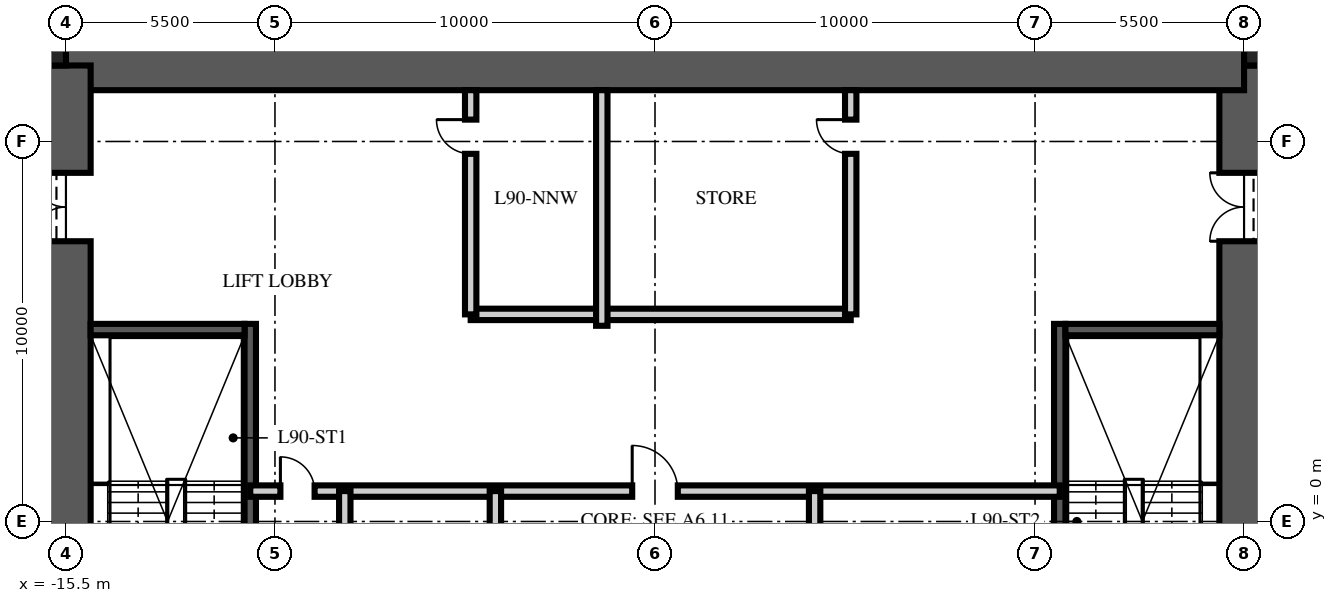
"""IFC4 building model, lengths in metres.
Left out: names, types, materials, properties, quantities, classifications, styles, units other than length and angle.
Written with IfcOpenShell. Run it as: python <this file> out.ifc"""

import sys

from ifc_helpers import new_model, si_unit, direction, frame, frame_2d, origin, origin_2d, place, context, subcontext, project, spatial, rectangle, extrude, element, fill, save


model = new_model("IFC4")
c1 = context("Model", 3, precision=1e-05, world=origin(), true_north=direction((0.0, 1.0)))
c2 = subcontext(c1, "Body", "Model", "MODEL_VIEW")
j1 = project(units=[si_unit("LENGTHUNIT", "METRE"), si_unit("PLANEANGLEUNIT", "RADIAN")], contexts=[c1])
p1 = place(None, origin())
s1 = spatial("IfcSite", under=j1, at=p1, CompositionType="ELEMENT")
p2 = place(p1, origin())
s2 = spatial("IfcBuilding", under=s1, at=p2, CompositionType="ELEMENT")
p3 = place(p2, frame((0.0, 0.0, 358.25)))
s3 = spatial("IfcBuildingStorey", under=s2, at=p3, CompositionType="ELEMENT", Elevation=358.25)
p4 = place(p3, frame((15.5, -12.0, -0.3), z_axis=(0.0, 0.0, 1.0), x_axis=(0.0, 1.0, 0.0)))
e1 = element("IfcWall", 1, at=p4, inside=s3, PredefinedType="SHEAR", context=c2, shape_type="SweptSolid", body=[
    extrude(rectangle(XDim=24.0, YDim=1.3, at=frame_2d((12.0, 0.0))), origin(), (0.0, 0.0, 1.0), 4.95),
])
p5 = place(p4, frame((3.125, 0.0, 0.3)))
e2 = element("IfcOpeningElement", 2, at=p5, cuts=e1, PredefinedType="OPENING", context=c2, shape_type="SweptSolid", body=[
    extrude(rectangle(XDim=1.2, YDim=2.1, at=frame_2d((0.6, 1.05))), frame((0.0, 0.66, 0.0), z_axis=(0.0, -1.0, 0.0), x_axis=(1.0, 0.0, 0.0)), (0.0, 0.0, 1.0), 1.32),
])
p6 = place(p4, frame((19.375, 0.0, 0.3)))
e3 = element("IfcOpeningElement", 3, at=p6, cuts=e1, PredefinedType="OPENING", context=c2, shape_type="SweptSolid", body=[
    extrude(rectangle(XDim=1.8, YDim=2.1, at=frame_2d((0.9, 1.05))), frame((0.0, 0.66, 0.0), z_axis=(0.0, -1.0, 0.0), x_axis=(1.0, 0.0, 0.0)), (0.0, 0.0, 1.0), 1.32),
])
p7 = place(p3, frame((-15.5, 12.0, -0.3), z_axis=(0.0, 0.0, 1.0), x_axis=(1.0, 0.0, 0.0)))
e4 = element("IfcWall", 4, at=p7, inside=s3, PredefinedType="SHEAR", context=c2, shape_type="SweptSolid", body=[
    extrude(rectangle(XDim=31.0, YDim=1.3, at=frame_2d((15.5, 0.0))), origin(), (0.0, 0.0, 1.0), 4.95),
])
p8 = place(p3, frame((-15.5, -12.0, -0.3), z_axis=(0.0, 0.0, 1.0), x_axis=(0.0, 1.0, 0.0)))
e5 = element("IfcWall", 5, at=p8, inside=s3, PredefinedType="SHEAR", context=c2, shape_type="SweptSolid", body=[
    extrude(rectangle(XDim=24.0, YDim=1.3, at=frame_2d((12.0, 0.0))), origin(), (0.0, 0.0, 1.0), 4.95),
])
p9 = place(p8, frame((3.125, 0.0, 0.3)))
e6 = element("IfcOpeningElement", 6, at=p9, cuts=e5, PredefinedType="OPENING", context=c2, shape_type="SweptSolid", body=[
    extrude(rectangle(XDim=1.2, YDim=2.1, at=frame_2d((0.6, 1.05))), frame((0.0, 0.66, 0.0), z_axis=(0.0, -1.0, 0.0), x_axis=(1.0, 0.0, 0.0)), (0.0, 0.0, 1.0), 1.32),
])
p10 = place(p8, frame((19.375, 0.0, 0.3)))
e7 = element("IfcOpeningElement", 7, at=p10, cuts=e5, PredefinedType="OPENING", context=c2, shape_type="SweptSolid", body=[
    extrude(rectangle(XDim=1.8, YDim=2.1, at=frame_2d((0.9, 1.05))), frame((0.0, 0.66, 0.0), z_axis=(0.0, -1.0, 0.0), x_axis=(1.0, 0.0, 0.0)), (0.0, 0.0, 1.0), 1.32),
])
for number, where, z_axis, x_axis in (
    (8, (15.825, 12.325, -0.3), (0.0, 0.0, 1.0), (1.0, 0.0, 0.0)),
    (9, (-15.825, 12.325, -0.3), (0.0, 0.0, 1.0), (1.0, 0.0, 0.0)),
):
    element("IfcColumn", number, at=place(p3, frame(where, z_axis=z_axis, x_axis=x_axis)), inside=s3, PredefinedType="COLUMN", context=c2, shape_type="SweptSolid", body=[
        extrude(rectangle(XDim=0.65, YDim=0.65, at=origin_2d()), origin(), (0.0, 0.0, 1.0), 4.95),
    ])
p11 = place(p3, frame((-10.65, -4.9, 0.0), z_axis=(0.0, 0.0, 1.0), x_axis=(0.0, 1.0, 0.0)))
e10 = element("IfcWall", 10, at=p11, inside=s3, PredefinedType="SOLIDWALL", context=c2, shape_type="SweptSolid", body=[
    extrude(rectangle(XDim=10.1, YDim=0.3, at=frame_2d((5.05, 0.0))), origin(), (0.0, 0.0, 1.0), 4.65),
])
p12 = place(p3, frame((-14.85, 5.05, 0.0), z_axis=(0.0, 0.0, 1.0), x_axis=(1.0, 0.0, 0.0)))
e11 = element("IfcWall", 11, at=p12, inside=s3, PredefinedType="SOLIDWALL", context=c2, shape_type="SweptSolid", body=[
    extrude(rectangle(XDim=4.05, YDim=0.3, at=frame_2d((2.025, 0.0))), origin(), (0.0, 0.0, 1.0), 4.65),
])
p13 = place(p3, frame((10.65, -4.9, 0.0), z_axis=(0.0, 0.0, 1.0), x_axis=(0.0, 1.0, 0.0)))
e12 = element("IfcWall", 12, at=p13, inside=s3, PredefinedType="SOLIDWALL", context=c2, shape_type="SweptSolid", body=[
    extrude(rectangle(XDim=10.1, YDim=0.3, at=frame_2d((5.05, 0.0))), origin(), (0.0, 0.0, 1.0), 4.65),
])
p14 = place(p3, frame((14.85, 5.05, 0.0), z_axis=(0.0, 0.0, 1.0), x_axis=(-1.0, 0.0, 0.0)))
e13 = element("IfcWall", 13, at=p14, inside=s3, PredefinedType="SOLIDWALL", context=c2, shape_type="SweptSolid", body=[
    extrude(rectangle(XDim=4.05, YDim=0.3, at=frame_2d((2.025, 0.0))), origin(), (0.0, 0.0, 1.0), 4.65),
])
p15 = place(p3, frame((-10.65, 0.8, 0.0), z_axis=(0.0, 0.0, 1.0), x_axis=(1.0, 0.0, 0.0)))
e14 = element("IfcWall", 14, at=p15, inside=s3, PredefinedType="PARTITIONING", context=c2, shape_type="SweptSolid", body=[
    extrude(rectangle(XDim=21.3, YDim=0.3, at=frame_2d((10.65, 0.0))), origin(), (0.0, 0.0, 1.0), 4.65),
])
p16 = place(p15, frame((10.05, 0.0, 0.0)))
e15 = element("IfcOpeningElement", 15, at=p16, cuts=e14, PredefinedType="OPENING", context=c2, shape_type="SweptSolid", body=[
    extrude(rectangle(XDim=1.2, YDim=2.1, at=frame_2d((0.6, 1.05))), frame((0.0, 0.16, 0.0), z_axis=(0.0, -1.0, 0.0), x_axis=(1.0, 0.0, 0.0)), (0.0, 0.0, 1.0), 0.32),
])
p17 = place(p15, frame((0.793, 0.0, 0.0)))
e16 = element("IfcOpeningElement", 16, at=p17, cuts=e14, PredefinedType="OPENING", context=c2, shape_type="SweptSolid", body=[
    extrude(rectangle(XDim=0.9, YDim=2.1, at=frame_2d((0.45, 1.05))), frame((0.0, 0.16, 0.0), z_axis=(0.0, -1.0, 0.0), x_axis=(1.0, 0.0, 0.0)), (0.0, 0.0, 1.0), 0.32),
])
p18 = place(p3, frame((-4.2, -6.65, 0.0), z_axis=(0.0, 0.0, 1.0), x_axis=(0.0, 1.0, 0.0)))
e17 = element("IfcWall", 17, at=p18, inside=s3, PredefinedType="PARTITIONING", context=c2, shape_type="SweptSolid", body=[
    extrude(rectangle(XDim=7.45, YDim=0.3, at=frame_2d((3.725, 0.0))), origin(), (0.0, 0.0, 1.0), 4.65),
])
p19 = place(p18, frame((3.275, 0.0, 0.0)))
e18 = element("IfcOpeningElement", 18, at=p19, cuts=e17, PredefinedType="OPENING", context=c2, shape_type="SweptSolid", body=[
    extrude(rectangle(XDim=0.9, YDim=2.1, at=frame_2d((0.45, 1.05))), frame((0.0, 0.16, 0.0), z_axis=(0.0, -1.0, 0.0), x_axis=(1.0, 0.0, 0.0)), (0.0, 0.0, 1.0), 0.32),
])
p20 = place(p3, frame((4.2, -6.65, 0.0), z_axis=(0.0, 0.0, 1.0), x_axis=(0.0, 1.0, 0.0)))
e19 = element("IfcWall", 19, at=p20, inside=s3, PredefinedType="PARTITIONING", context=c2, shape_type="SweptSolid", body=[
    extrude(rectangle(XDim=7.45, YDim=0.3, at=frame_2d((3.725, 0.0))), origin(), (0.0, 0.0, 1.0), 4.65),
])
p21 = place(p20, frame((0.866, 0.0, 0.0)))
e20 = element("IfcOpeningElement", 20, at=p21, cuts=e19, PredefinedType="OPENING", context=c2, shape_type="SweptSolid", body=[
    extrude(rectangle(XDim=0.9, YDim=2.1, at=frame_2d((0.45, 1.05))), frame((0.0, 0.16, 0.0), z_axis=(0.0, -1.0, 0.0), x_axis=(1.0, 0.0, 0.0)), (0.0, 0.0, 1.0), 0.32),
])
p22 = place(p20, frame((4.591, 0.0, 0.0)))
e21 = element("IfcOpeningElement", 21, at=p22, cuts=e19, PredefinedType="OPENING", context=c2, shape_type="SweptSolid", body=[
    extrude(rectangle(XDim=0.9, YDim=2.1, at=frame_2d((0.45, 1.05))), frame((0.0, 0.16, 0.0), z_axis=(0.0, -1.0, 0.0), x_axis=(1.0, 0.0, 0.0)), (0.0, 0.0, 1.0), 0.32),
])
p23 = place(p3, frame((-8.163, -6.65, 0.0), z_axis=(0.0, 0.0, 1.0), x_axis=(0.0, 1.0, 0.0)))
e22 = element("IfcWall", 22, at=p23, inside=s3, PredefinedType="PARTITIONING", context=c2, shape_type="SweptSolid", body=[
    extrude(rectangle(XDim=7.45, YDim=0.3, at=frame_2d((3.725, 0.0))), origin(), (0.0, 0.0, 1.0), 4.65),
])
p24 = place(p3, frame((-4.85, 5.45, 0.0), z_axis=(0.0, 0.0, 1.0), x_axis=(1.0, 0.0, 0.0)))
e23 = element("IfcWall", 23, at=p24, inside=s3, PredefinedType="PARTITIONING", context=c2, shape_type="SweptSolid", body=[
    extrude(rectangle(XDim=10.0, YDim=0.3, at=frame_2d((5.0, 0.0))), origin(), (0.0, 0.0, 1.0), 4.65),
])
p25 = place(p3, frame((-4.85, 5.45, 0.0), z_axis=(0.0, 0.0, 1.0), x_axis=(0.0, 1.0, 0.0)))
e24 = element("IfcWall", 24, at=p25, inside=s3, PredefinedType="PARTITIONING", context=c2, shape_type="SweptSolid", body=[
    extrude(rectangle(XDim=5.9, YDim=0.3, at=frame_2d((2.95, 0.0))), origin(), (0.0, 0.0, 1.0), 4.65),
])
p26 = place(p25, frame((4.225, 0.0, 0.0)))
e25 = element("IfcOpeningElement", 25, at=p26, cuts=e24, PredefinedType="OPENING", context=c2, shape_type="SweptSolid", body=[
    extrude(rectangle(XDim=0.9, YDim=2.1, at=frame_2d((0.45, 1.05))), frame((0.0, 0.16, 0.0), z_axis=(0.0, -1.0, 0.0), x_axis=(1.0, 0.0, 0.0)), (0.0, 0.0, 1.0), 0.32),
])
p27 = place(p3, frame((5.15, 5.45, 0.0), z_axis=(0.0, 0.0, 1.0), x_axis=(0.0, 1.0, 0.0)))
e26 = element("IfcWall", 26, at=p27, inside=s3, PredefinedType="PARTITIONING", context=c2, shape_type="SweptSolid", body=[
    extrude(rectangle(XDim=5.9, YDim=0.3, at=frame_2d((2.95, 0.0))), origin(), (0.0, 0.0, 1.0), 4.65),
])
p28 = place(p27, frame((4.225, 0.0, 0.0)))
e27 = element("IfcOpeningElement", 27, at=p28, cuts=e26, PredefinedType="OPENING", context=c2, shape_type="SweptSolid", body=[
    extrude(rectangle(XDim=0.9, YDim=2.1, at=frame_2d((0.45, 1.05))), frame((0.0, 0.16, 0.0), z_axis=(0.0, -1.0, 0.0), x_axis=(1.0, 0.0, 0.0)), (0.0, 0.0, 1.0), 0.32),
])
p29 = place(p3, frame((-1.4, 5.15, 0.0), z_axis=(0.0, 0.0, 1.0), x_axis=(0.0, 1.0, 0.0)))
e28 = element("IfcWall", 28, at=p29, inside=s3, PredefinedType="PARTITIONING", context=c2, shape_type="SweptSolid", body=[
    extrude(rectangle(XDim=6.2, YDim=0.3, at=frame_2d((3.1, 0.0))), origin(), (0.0, 0.0, 1.0), 4.65),
])
p30 = place(p10, origin())
e29 = element("IfcDoor", 29, at=p30, inside=s3, OperationType="DOUBLE_DOOR_SINGLE_SWING", PredefinedType="DOOR", context=c2, shape_type="SweptSolid", body=[
    extrude(rectangle(XDim=1.8, YDim=2.1, at=frame_2d((0.9, 1.05))), frame((0.0, 0.025, 0.0), z_axis=(0.0, -1.0, 0.0), x_axis=(1.0, 0.0, 0.0)), (0.0, 0.0, 1.0), 0.05),
])
fill(e7, e29)
p31 = place(p6, origin())
e30 = element("IfcDoor", 30, at=p31, inside=s3, OperationType="DOUBLE_DOOR_SINGLE_SWING", PredefinedType="DOOR", context=c2, shape_type="SweptSolid", body=[
    extrude(rectangle(XDim=1.8, YDim=2.1, at=frame_2d((0.9, 1.05))), frame((0.0, 0.025, 0.0), z_axis=(0.0, -1.0, 0.0), x_axis=(1.0, 0.0, 0.0)), (0.0, 0.0, 1.0), 0.05),
])
fill(e3, e30)
p32 = place(p16, origin())
e31 = element("IfcDoor", 31, at=p32, inside=s3, OperationType="SINGLE_SWING_LEFT", PredefinedType="DOOR", context=c2, shape_type="SweptSolid", body=[
    extrude(rectangle(XDim=1.2, YDim=2.1, at=frame_2d((0.6, 1.05))), frame((0.0, 0.025, 0.0), z_axis=(0.0, -1.0, 0.0), x_axis=(1.0, 0.0, 0.0)), (0.0, 0.0, 1.0), 0.05),
])
fill(e15, e31)
p33 = place(p17, origin())
e32 = element("IfcDoor", 32, at=p33, inside=s3, OperationType="SINGLE_SWING_LEFT", PredefinedType="DOOR", context=c2, shape_type="SweptSolid", body=[
    extrude(rectangle(XDim=0.9, YDim=2.1, at=frame_2d((0.45, 1.05))), frame((0.0, 0.025, 0.0), z_axis=(0.0, -1.0, 0.0), x_axis=(1.0, 0.0, 0.0)), (0.0, 0.0, 1.0), 0.05),
])
fill(e16, e32)
p34 = place(p26, origin())
e33 = element("IfcDoor", 33, at=p34, inside=s3, OperationType="SINGLE_SWING_RIGHT", PredefinedType="DOOR", context=c2, shape_type="SweptSolid", body=[
    extrude(rectangle(XDim=0.9, YDim=2.1, at=frame_2d((0.45, 1.05))), frame((0.0, 0.025, 0.0), z_axis=(0.0, -1.0, 0.0), x_axis=(1.0, 0.0, 0.0)), (0.0, 0.0, 1.0), 0.05),
])
fill(e25, e33)
p35 = place(p28, origin())
e34 = element("IfcDoor", 34, at=p35, inside=s3, OperationType="SINGLE_SWING_RIGHT", PredefinedType="DOOR", context=c2, shape_type="SweptSolid", body=[
    extrude(rectangle(XDim=0.9, YDim=2.1, at=frame_2d((0.45, 1.05))), frame((0.0, 0.025, 0.0), z_axis=(0.0, -1.0, 0.0), x_axis=(1.0, 0.0, 0.0)), (0.0, 0.0, 1.0), 0.05),
])
fill(e27, e34)
save(model, sys.argv[1])
